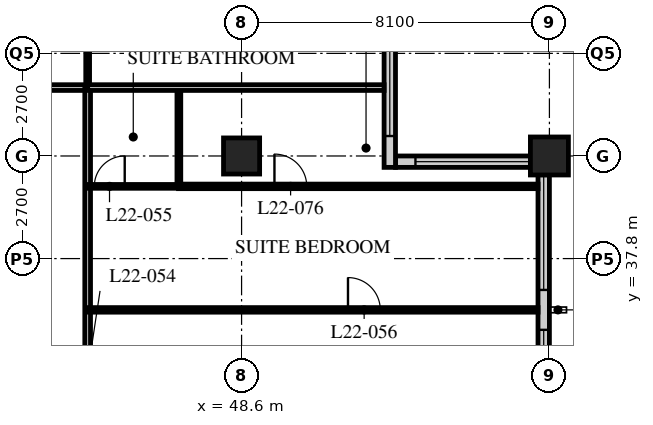
"""IFC4 building model, lengths in metres.
Left out: names, types, materials, properties, quantities, classifications, styles, units other than length and angle.
Written with IfcOpenShell. Run it as: python <this file> out.ifc"""

import sys

from ifc_helpers import new_model, si_unit, direction, frame, frame_2d, origin, origin_2d, place, context, subcontext, project, spatial, rectangle, hollow_rectangle, extrude, element, fill, save


model = new_model("IFC4")
c1 = context("Model", 3, precision=1e-05, world=origin(), true_north=direction((0.0, 1.0)))
c2 = subcontext(c1, "Body", "Model", "MODEL_VIEW")
j1 = project(units=[si_unit("LENGTHUNIT", "METRE"), si_unit("PLANEANGLEUNIT", "RADIAN")], contexts=[c1])
p1 = place(None, origin())
s1 = spatial("IfcSite", under=j1, at=p1, CompositionType="ELEMENT")
p2 = place(p1, origin())
s2 = spatial("IfcBuilding", under=s1, at=p2, CompositionType="ELEMENT")
p3 = place(p2, frame((0.0, 0.0, 87.4)))
s3 = spatial("IfcBuildingStorey", under=s2, at=p3, CompositionType="ELEMENT", Elevation=87.4)
p4 = place(p3, frame((48.6, 40.5, 0.0), z_axis=(0.0, 0.0, 1.0), x_axis=(1.0, 0.0, 0.0)))
e1 = element("IfcColumn", 1, at=p4, inside=s3, PredefinedType="COLUMN", context=c2, shape_type="SweptSolid", body=[
    extrude(hollow_rectangle(XDim=0.95, YDim=0.95, WallThickness=0.095, at=origin_2d()), origin(), (0.0, 0.0, 1.0), 3.4),
])
p5 = place(p3, frame((56.7, 40.5, 0.0), z_axis=(0.0, 0.0, 1.0), x_axis=(1.0, 0.0, 0.0)))
e2 = element("IfcColumn", 2, at=p5, inside=s3, PredefinedType="COLUMN", context=c2, shape_type="SweptSolid", body=[
    extrude(hollow_rectangle(XDim=1.0, YDim=1.0, WallThickness=0.1, at=origin_2d()), origin(), (0.0, 0.0, 1.0), 3.4),
])
p6 = place(p3, frame((56.55, 8.4, 0.0), z_axis=(0.0, 0.0, 1.0), x_axis=(0.0, 1.0, 0.0)))
e3 = element("IfcWall", 3, at=p6, inside=s3, PredefinedType="SOLIDWALL", context=c2, shape_type="SweptSolid", body=[
    extrude(rectangle(XDim=32.1, YDim=0.3, at=frame_2d((16.05, 0.0))), origin(), (0.0, 0.0, 1.0), 2.05),
])
p7 = place(p6, frame((0.225, 0.0, 0.9)))
e4 = element("IfcOpeningElement", 4, at=p7, cuts=e3, PredefinedType="OPENING", context=c2, shape_type="SweptSolid", body=[
    extrude(rectangle(XDim=3.0, YDim=1.1, at=frame_2d((1.5, 0.55))), frame((0.0, 0.16, 0.0), z_axis=(0.0, -1.0, 0.0), x_axis=(1.0, 0.0, 0.0)), (0.0, 0.0, 1.0), 0.32),
])
p8 = place(p6, frame((4.275, 0.0, 0.9)))
e5 = element("IfcOpeningElement", 5, at=p8, cuts=e3, PredefinedType="OPENING", context=c2, shape_type="SweptSolid", body=[
    extrude(rectangle(XDim=3.0, YDim=1.1, at=frame_2d((1.5, 0.55))), frame((0.0, 0.16, 0.0), z_axis=(0.0, -1.0, 0.0), x_axis=(1.0, 0.0, 0.0)), (0.0, 0.0, 1.0), 0.32),
])
p9 = place(p6, frame((8.325, 0.0, 0.9)))
e6 = element("IfcOpeningElement", 6, at=p9, cuts=e3, PredefinedType="OPENING", context=c2, shape_type="SweptSolid", body=[
    extrude(rectangle(XDim=3.0, YDim=1.1, at=frame_2d((1.5, 0.55))), frame((0.0, 0.16, 0.0), z_axis=(0.0, -1.0, 0.0), x_axis=(1.0, 0.0, 0.0)), (0.0, 0.0, 1.0), 0.32),
])
p10 = place(p6, frame((12.375, 0.0, 0.9)))
e7 = element("IfcOpeningElement", 7, at=p10, cuts=e3, PredefinedType="OPENING", context=c2, shape_type="SweptSolid", body=[
    extrude(rectangle(XDim=3.0, YDim=1.1, at=frame_2d((1.5, 0.55))), frame((0.0, 0.16, 0.0), z_axis=(0.0, -1.0, 0.0), x_axis=(1.0, 0.0, 0.0)), (0.0, 0.0, 1.0), 0.32),
])
p11 = place(p6, frame((16.425, 0.0, 0.9)))
e8 = element("IfcOpeningElement", 8, at=p11, cuts=e3, PredefinedType="OPENING", context=c2, shape_type="SweptSolid", body=[
    extrude(rectangle(XDim=3.0, YDim=1.1, at=frame_2d((1.5, 0.55))), frame((0.0, 0.16, 0.0), z_axis=(0.0, -1.0, 0.0), x_axis=(1.0, 0.0, 0.0)), (0.0, 0.0, 1.0), 0.32),
])
p12 = place(p6, frame((20.475, 0.0, 0.9)))
e9 = element("IfcOpeningElement", 9, at=p12, cuts=e3, PredefinedType="OPENING", context=c2, shape_type="SweptSolid", body=[
    extrude(rectangle(XDim=3.0, YDim=1.1, at=frame_2d((1.5, 0.55))), frame((0.0, 0.16, 0.0), z_axis=(0.0, -1.0, 0.0), x_axis=(1.0, 0.0, 0.0)), (0.0, 0.0, 1.0), 0.32),
])
p13 = place(p6, frame((24.525, 0.0, 0.9)))
e10 = element("IfcOpeningElement", 10, at=p13, cuts=e3, PredefinedType="OPENING", context=c2, shape_type="SweptSolid", body=[
    extrude(rectangle(XDim=3.0, YDim=1.1, at=frame_2d((1.5, 0.55))), frame((0.0, 0.16, 0.0), z_axis=(0.0, -1.0, 0.0), x_axis=(1.0, 0.0, 0.0)), (0.0, 0.0, 1.0), 0.32),
])
p14 = place(p6, frame((28.575, 0.0, 0.9)))
e11 = element("IfcOpeningElement", 11, at=p14, cuts=e3, PredefinedType="OPENING", context=c2, shape_type="SweptSolid", body=[
    extrude(rectangle(XDim=3.0, YDim=1.1, at=frame_2d((1.5, 0.55))), frame((0.0, 0.16, 0.0), z_axis=(0.0, -1.0, 0.0), x_axis=(1.0, 0.0, 0.0)), (0.0, 0.0, 1.0), 0.32),
])
p15 = place(p3, frame((56.4, 40.35, 0.0), z_axis=(0.0, 0.0, 1.0), x_axis=(-1.0, 0.0, 0.0)))
e12 = element("IfcWall", 12, at=p15, inside=s3, PredefinedType="SOLIDWALL", context=c2, shape_type="SweptSolid", body=[
    extrude(rectangle(XDim=3.75, YDim=0.3, at=frame_2d((1.875, 0.0))), origin(), (0.0, 0.0, 1.0), 2.05),
])
p16 = place(p15, frame((0.225, 0.0, 0.9)))
e13 = element("IfcOpeningElement", 13, at=p16, cuts=e12, PredefinedType="OPENING", context=c2, shape_type="SweptSolid", body=[
    extrude(rectangle(XDim=3.0, YDim=1.1, at=frame_2d((1.5, 0.55))), frame((0.0, 0.16, 0.0), z_axis=(0.0, -1.0, 0.0), x_axis=(1.0, 0.0, 0.0)), (0.0, 0.0, 1.0), 0.32),
])
p17 = place(p3, frame((52.5, 40.2, 0.0), z_axis=(0.0, 0.0, 1.0), x_axis=(0.0, 1.0, 0.0)))
e14 = element("IfcWall", 14, at=p17, inside=s3, PredefinedType="SOLIDWALL", context=c2, shape_type="SweptSolid", body=[
    extrude(rectangle(XDim=4.35, YDim=0.3, at=frame_2d((2.175, 0.0))), origin(), (0.0, 0.0, 1.0), 2.45),
])
p18 = place(p17, frame((0.825, 0.0, 0.9)))
e15 = element("IfcOpeningElement", 15, at=p18, cuts=e14, PredefinedType="OPENING", context=c2, shape_type="SweptSolid", body=[
    extrude(rectangle(XDim=3.0, YDim=1.1, at=frame_2d((1.5, 0.55))), frame((0.0, 0.16, 0.0), z_axis=(0.0, -1.0, 0.0), x_axis=(1.0, 0.0, 0.0)), (0.0, 0.0, 1.0), 0.32),
])
p19 = place(p3, frame((12.15, 42.3, 0.0), z_axis=(0.0, 0.0, 1.0), x_axis=(1.0, 0.0, 0.0)))
e16 = element("IfcWall", 16, at=p19, inside=s3, PredefinedType="PARTITIONING", context=c2, shape_type="SweptSolid", body=[
    extrude(rectangle(XDim=32.4, YDim=0.15, at=frame_2d((16.2, 0.0))), origin(), (0.0, 0.0, 1.0), 3.15),
])
p20 = place(p19, frame((5.95, 0.0, 0.0)))
e17 = element("IfcOpeningElement", 17, at=p20, cuts=e16, PredefinedType="OPENING", context=c2, shape_type="SweptSolid", body=[
    extrude(rectangle(XDim=1.0, YDim=2.1, at=frame_2d((0.5, 1.05))), frame((0.0, 0.085, 0.0), z_axis=(0.0, -1.0, 0.0), x_axis=(1.0, 0.0, 0.0)), (0.0, 0.0, 1.0), 0.17),
])
p21 = place(p19, frame((14.6, 0.0, 0.0)))
e18 = element("IfcOpeningElement", 18, at=p21, cuts=e16, PredefinedType="OPENING", context=c2, shape_type="SweptSolid", body=[
    extrude(rectangle(XDim=1.0, YDim=2.1, at=frame_2d((0.5, 1.05))), frame((0.0, 0.085, 0.0), z_axis=(0.0, -1.0, 0.0), x_axis=(1.0, 0.0, 0.0)), (0.0, 0.0, 1.0), 0.17),
])
p22 = place(p19, frame((18.65, 0.0, 0.0)))
e19 = element("IfcOpeningElement", 19, at=p22, cuts=e16, PredefinedType="OPENING", context=c2, shape_type="SweptSolid", body=[
    extrude(rectangle(XDim=1.0, YDim=2.1, at=frame_2d((0.5, 1.05))), frame((0.0, 0.085, 0.0), z_axis=(0.0, -1.0, 0.0), x_axis=(1.0, 0.0, 0.0)), (0.0, 0.0, 1.0), 0.17),
])
p23 = place(p19, frame((22.15, 0.0, 0.0)))
e20 = element("IfcOpeningElement", 20, at=p23, cuts=e16, PredefinedType="OPENING", context=c2, shape_type="SweptSolid", body=[
    extrude(rectangle(XDim=1.0, YDim=2.1, at=frame_2d((0.5, 1.05))), frame((0.0, 0.085, 0.0), z_axis=(0.0, -1.0, 0.0), x_axis=(1.0, 0.0, 0.0)), (0.0, 0.0, 1.0), 0.17),
])
p24 = place(p19, frame((29.025, 0.0, 0.0)))
e21 = element("IfcOpeningElement", 21, at=p24, cuts=e16, PredefinedType="OPENING", context=c2, shape_type="SweptSolid", body=[
    extrude(rectangle(XDim=1.0, YDim=2.1, at=frame_2d((0.5, 1.05))), frame((0.0, 0.085, 0.0), z_axis=(0.0, -1.0, 0.0), x_axis=(1.0, 0.0, 0.0)), (0.0, 0.0, 1.0), 0.17),
])
p25 = place(p19, frame((2.375, 0.0, 0.0)))
e22 = element("IfcOpeningElement", 22, at=p25, cuts=e16, PredefinedType="OPENING", context=c2, shape_type="SweptSolid", body=[
    extrude(rectangle(XDim=1.0, YDim=2.1, at=frame_2d((0.5, 1.05))), frame((0.0, 0.085, 0.0), z_axis=(0.0, -1.0, 0.0), x_axis=(1.0, 0.0, 0.0)), (0.0, 0.0, 1.0), 0.17),
])
p26 = place(p3, frame((44.55, 16.2, 0.0), z_axis=(0.0, 0.0, 1.0), x_axis=(0.0, 1.0, 0.0)))
e23 = element("IfcWall", 23, at=p26, inside=s3, PredefinedType="PARTITIONING", context=c2, shape_type="SweptSolid", body=[
    extrude(rectangle(XDim=26.1, YDim=0.15, at=frame_2d((13.05, 0.0))), origin(), (0.0, 0.0, 1.0), 3.15),
])
p27 = place(p26, frame((2.75, 0.0, 0.0)))
e24 = element("IfcOpeningElement", 24, at=p27, cuts=e23, PredefinedType="OPENING", context=c2, shape_type="SweptSolid", body=[
    extrude(rectangle(XDim=1.0, YDim=2.1, at=frame_2d((0.5, 1.05))), frame((0.0, 0.085, 0.0), z_axis=(0.0, -1.0, 0.0), x_axis=(1.0, 0.0, 0.0)), (0.0, 0.0, 1.0), 0.17),
])
p28 = place(p26, frame((6.5, 0.0, 0.0)))
e25 = element("IfcOpeningElement", 25, at=p28, cuts=e23, PredefinedType="OPENING", context=c2, shape_type="SweptSolid", body=[
    extrude(rectangle(XDim=1.0, YDim=2.1, at=frame_2d((0.5, 1.05))), frame((0.0, 0.085, 0.0), z_axis=(0.0, -1.0, 0.0), x_axis=(1.0, 0.0, 0.0)), (0.0, 0.0, 1.0), 0.17),
])
p29 = place(p26, frame((10.0, 0.0, 0.0)))
e26 = element("IfcOpeningElement", 26, at=p29, cuts=e23, PredefinedType="OPENING", context=c2, shape_type="SweptSolid", body=[
    extrude(rectangle(XDim=1.0, YDim=2.1, at=frame_2d((0.5, 1.05))), frame((0.0, 0.085, 0.0), z_axis=(0.0, -1.0, 0.0), x_axis=(1.0, 0.0, 0.0)), (0.0, 0.0, 1.0), 0.17),
])
p30 = place(p26, frame((18.1, 0.0, 0.0)))
e27 = element("IfcOpeningElement", 27, at=p30, cuts=e23, PredefinedType="OPENING", context=c2, shape_type="SweptSolid", body=[
    extrude(rectangle(XDim=1.0, YDim=2.1, at=frame_2d((0.5, 1.05))), frame((0.0, 0.085, 0.0), z_axis=(0.0, -1.0, 0.0), x_axis=(1.0, 0.0, 0.0)), (0.0, 0.0, 1.0), 0.17),
])
p31 = place(p3, frame((46.95, 39.7, 0.0), z_axis=(0.0, 0.0, 1.0), x_axis=(0.0, 1.0, 0.0)))
e28 = element("IfcWall", 28, at=p31, inside=s3, PredefinedType="PARTITIONING", context=c2, shape_type="SweptSolid", body=[
    extrude(rectangle(XDim=2.6, YDim=0.1, at=frame_2d((1.3, 0.0))), origin(), (0.0, 0.0, 1.0), 3.15),
])
p32 = place(p3, frame((44.55, 39.7, 0.0), z_axis=(0.0, 0.0, 1.0), x_axis=(1.0, 0.0, 0.0)))
e29 = element("IfcWall", 29, at=p32, inside=s3, PredefinedType="PARTITIONING", context=c2, shape_type="SweptSolid", body=[
    extrude(rectangle(XDim=2.4, YDim=0.1, at=frame_2d((1.2, 0.0))), origin(), (0.0, 0.0, 1.0), 3.15),
])
p33 = place(p32, frame((0.175, 0.0, 0.0)))
e30 = element("IfcOpeningElement", 30, at=p33, cuts=e29, PredefinedType="OPENING", context=c2, shape_type="SweptSolid", body=[
    extrude(rectangle(XDim=0.8, YDim=2.1, at=frame_2d((0.4, 1.05))), frame((0.0, 0.06, 0.0), z_axis=(0.0, -1.0, 0.0), x_axis=(1.0, 0.0, 0.0)), (0.0, 0.0, 1.0), 0.12),
])
p34 = place(p3, frame((44.55, 36.45, 0.0), z_axis=(0.0, 0.0, 1.0), x_axis=(1.0, 0.0, 0.0)))
e31 = element("IfcWall", 31, at=p34, inside=s3, PredefinedType="PARTITIONING", context=c2, shape_type="SweptSolid", body=[
    extrude(rectangle(XDim=11.85, YDim=0.12, at=frame_2d((5.925, 0.0))), origin(), (0.0, 0.0, 1.0), 3.15),
])
p35 = place(p34, frame((6.85, 0.0, 0.0)))
e32 = element("IfcOpeningElement", 32, at=p35, cuts=e31, PredefinedType="OPENING", context=c2, shape_type="SweptSolid", body=[
    extrude(rectangle(XDim=0.85, YDim=2.1, at=frame_2d((0.425, 1.05))), frame((0.0, 0.07, 0.0), z_axis=(0.0, -1.0, 0.0), x_axis=(1.0, 0.0, 0.0)), (0.0, 0.0, 1.0), 0.14),
])
p36 = place(p3, frame((44.55, 42.3, 0.0), z_axis=(0.0, 0.0, 1.0), x_axis=(0.0, 1.0, 0.0)))
e33 = element("IfcWall", 33, at=p36, inside=s3, PredefinedType="PARTITIONING", context=c2, shape_type="SweptSolid", body=[
    extrude(rectangle(XDim=2.4, YDim=0.1, at=frame_2d((1.2, 0.0))), origin(), (0.0, 0.0, 1.0), 3.15),
])
p37 = place(p3, frame((44.55, 42.3, 0.0), z_axis=(0.0, 0.0, 1.0), x_axis=(1.0, 0.0, 0.0)))
e34 = element("IfcWall", 34, at=p37, inside=s3, PredefinedType="PARTITIONING", context=c2, shape_type="SweptSolid", body=[
    extrude(rectangle(XDim=7.8, YDim=0.15, at=frame_2d((3.9, 0.0))), origin(), (0.0, 0.0, 1.0), 3.15),
])
p38 = place(p3, frame((56.4, 39.7, 0.0), z_axis=(0.0, 0.0, 1.0), x_axis=(-1.0, 0.0, 0.0)))
e35 = element("IfcWall", 35, at=p38, inside=s3, PredefinedType="PARTITIONING", context=c2, shape_type="SweptSolid", body=[
    extrude(rectangle(XDim=9.46, YDim=0.12, at=frame_2d((4.73, 0.0))), origin(), (0.0, 0.0, 1.0), 3.15),
])
p39 = place(p38, frame((6.085, 0.0, 0.0)))
e36 = element("IfcOpeningElement", 36, at=p39, cuts=e35, PredefinedType="OPENING", context=c2, shape_type="SweptSolid", body=[
    extrude(rectangle(XDim=0.85, YDim=2.0, at=frame_2d((0.425, 1.0))), frame((0.0, 0.07, 0.0), z_axis=(0.0, -1.0, 0.0), x_axis=(1.0, 0.0, 0.0)), (0.0, 0.0, 1.0), 0.14),
])
p40 = place(p13, origin())
e37 = element("IfcWindow", 37, at=p40, inside=s3, PartitioningType="SINGLE_PANEL", PredefinedType="WINDOW", context=c2, shape_type="SweptSolid", body=[
    extrude(rectangle(XDim=3.0, YDim=1.1, at=frame_2d((1.5, 0.55))), frame((0.0, 0.03, 0.0), z_axis=(0.0, -1.0, 0.0), x_axis=(1.0, 0.0, 0.0)), (0.0, 0.0, 1.0), 0.06),
])
fill(e10, e37)
p41 = place(p14, origin())
e38 = element("IfcWindow", 38, at=p41, inside=s3, PartitioningType="SINGLE_PANEL", PredefinedType="WINDOW", context=c2, shape_type="SweptSolid", body=[
    extrude(rectangle(XDim=3.0, YDim=1.1, at=frame_2d((1.5, 0.55))), frame((0.0, 0.03, 0.0), z_axis=(0.0, -1.0, 0.0), x_axis=(1.0, 0.0, 0.0)), (0.0, 0.0, 1.0), 0.06),
])
fill(e11, e38)
p42 = place(p16, origin())
e39 = element("IfcWindow", 39, at=p42, inside=s3, PartitioningType="SINGLE_PANEL", PredefinedType="WINDOW", context=c2, shape_type="SweptSolid", body=[
    extrude(rectangle(XDim=3.0, YDim=1.1, at=frame_2d((1.5, 0.55))), frame((0.0, 0.03, 0.0), z_axis=(0.0, -1.0, 0.0), x_axis=(1.0, 0.0, 0.0)), (0.0, 0.0, 1.0), 0.06),
])
fill(e13, e39)
p43 = place(p18, origin())
e40 = element("IfcWindow", 40, at=p43, inside=s3, PartitioningType="SINGLE_PANEL", PredefinedType="WINDOW", context=c2, shape_type="SweptSolid", body=[
    extrude(rectangle(XDim=3.0, YDim=1.1, at=frame_2d((1.5, 0.55))), frame((0.0, 0.03, 0.0), z_axis=(0.0, -1.0, 0.0), x_axis=(1.0, 0.0, 0.0)), (0.0, 0.0, 1.0), 0.06),
])
fill(e15, e40)
p44 = place(p33, origin())
e41 = element("IfcDoor", 41, at=p44, inside=s3, OperationType="SINGLE_SWING_RIGHT", PredefinedType="DOOR", context=c2, shape_type="SweptSolid", body=[
    extrude(rectangle(XDim=0.8, YDim=2.1, at=frame_2d((0.4, 1.05))), frame((0.0, 0.025, 0.0), z_axis=(0.0, -1.0, 0.0), x_axis=(1.0, 0.0, 0.0)), (0.0, 0.0, 1.0), 0.05),
])
fill(e30, e41)
p45 = place(p35, origin())
e42 = element("IfcDoor", 42, at=p45, inside=s3, OperationType="SINGLE_SWING_LEFT", PredefinedType="DOOR", context=c2, shape_type="SweptSolid", body=[
    extrude(rectangle(XDim=0.85, YDim=2.1, at=frame_2d((0.425, 1.05))), frame((0.0, 0.025, 0.0), z_axis=(0.0, -1.0, 0.0), x_axis=(1.0, 0.0, 0.0)), (0.0, 0.0, 1.0), 0.05),
])
fill(e32, e42)
p46 = place(p39, origin())
e43 = element("IfcDoor", 43, at=p46, inside=s3, OperationType="SINGLE_SWING_LEFT", PredefinedType="DOOR", context=c2, shape_type="SweptSolid", body=[
    extrude(rectangle(XDim=0.85, YDim=2.0, at=frame_2d((0.425, 1.0))), frame((0.0, 0.025, 0.0), z_axis=(0.0, -1.0, 0.0), x_axis=(1.0, 0.0, 0.0)), (0.0, 0.0, 1.0), 0.05),
])
fill(e36, e43)
save(model, sys.argv[1])
